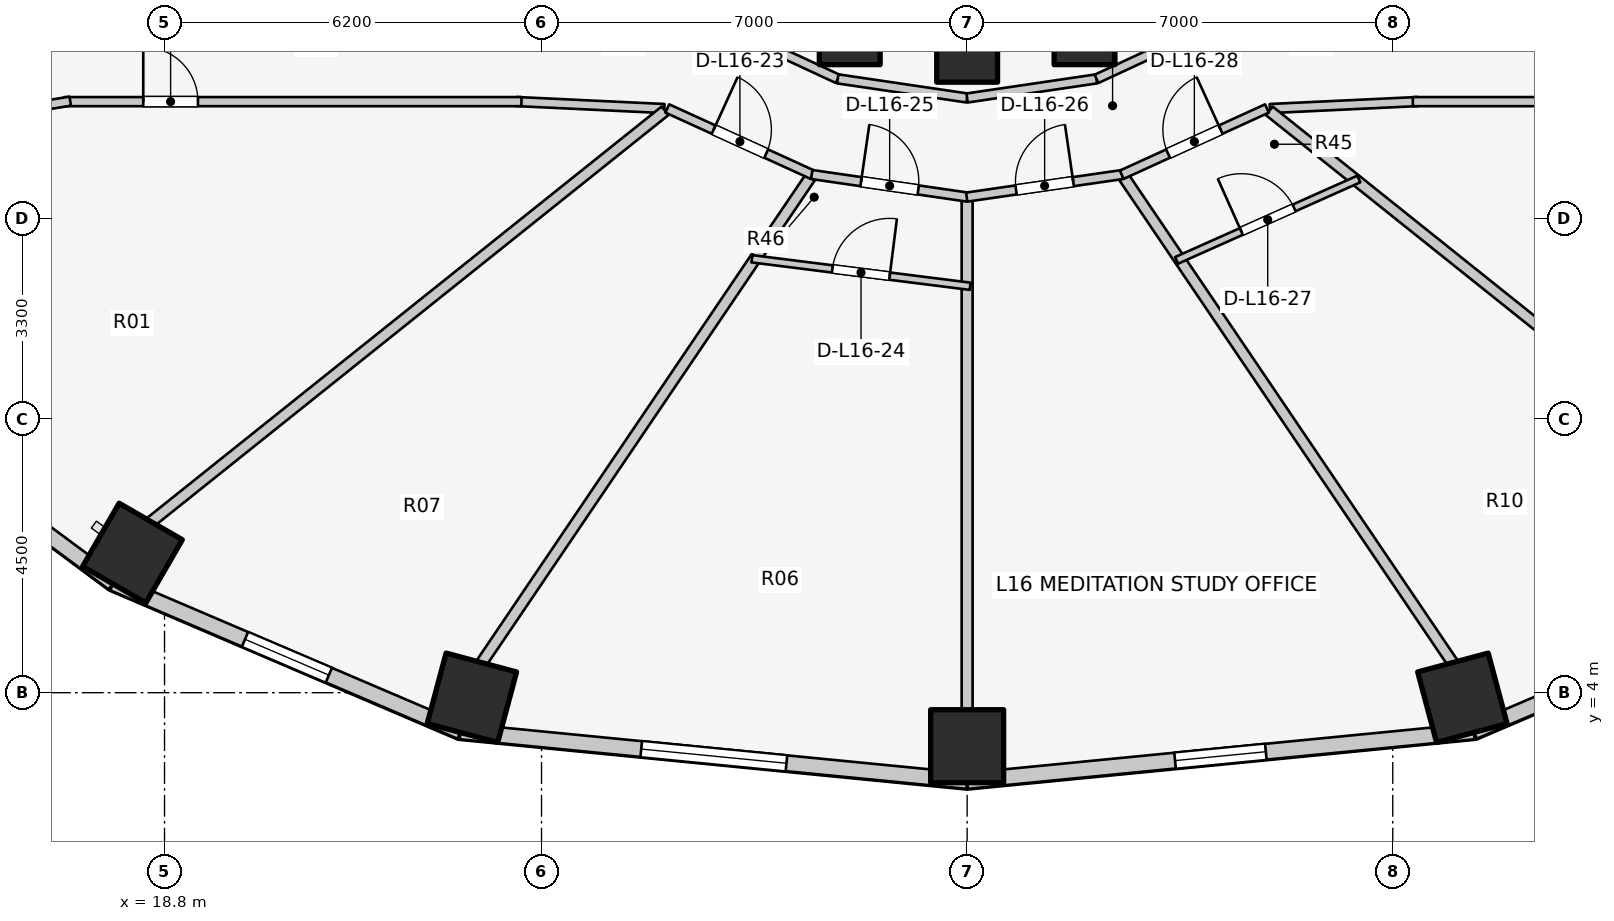
"""IFC4 building model, lengths in metres.
Left out: names, types, materials, properties, quantities, classifications, styles, units other than length and angle.
Written with IfcOpenShell. Run it as: python <this file> out.ifc"""

import sys

from ifc_helpers import new_model, si_unit, direction, frame, frame_2d, origin, origin_2d, place, context, subcontext, project, spatial, rectangle, extrude, element, fill, save


model = new_model("IFC4")
c1 = context("Model", 3, precision=1e-05, world=origin(), true_north=direction((0.0, 1.0)))
c2 = subcontext(c1, "Body", "Model", "MODEL_VIEW")
j1 = project(units=[si_unit("LENGTHUNIT", "METRE"), si_unit("PLANEANGLEUNIT", "RADIAN")], contexts=[c1])
p1 = place(None, origin())
s1 = spatial("IfcSite", under=j1, at=p1, CompositionType="ELEMENT")
p2 = place(p1, origin())
s2 = spatial("IfcBuilding", under=s1, at=p2, CompositionType="ELEMENT")
p3 = place(p2, frame((0.0, 0.0, 55.5)))
s3 = spatial("IfcBuildingStorey", under=s2, at=p3, CompositionType="ELEMENT", Elevation=55.5)
p4 = place(p3, frame((18.273, 6.296, 0.0), z_axis=(0.0, 0.0, 1.0), x_axis=(-0.5, -0.866025403784, 0.0)))
e1 = element("IfcColumn", 1, at=p4, inside=s3, PredefinedType="COLUMN", context=c2, shape_type="SweptSolid", body=[
    extrude(rectangle(XDim=1.2, YDim=1.2, at=origin_2d()), origin(), (0.0, 0.0, 1.0), 3.1),
])
p5 = place(p3, frame((30.069, 14.828, 0.0), z_axis=(0.0, 0.0, 1.0), x_axis=(1.0, 0.0, 0.0)))
e2 = element("IfcColumn", 2, at=p5, inside=s3, PredefinedType="COLUMN", context=c2, shape_type="SweptSolid", body=[
    extrude(rectangle(XDim=1.0, YDim=1.0, at=origin_2d()), origin(), (0.0, 0.0, 1.0), 3.1),
])
p6 = place(p3, frame((23.855, 3.916, 0.0), z_axis=(0.0, 0.0, 1.0), x_axis=(-0.258819045103, -0.965925826289, 0.0)))
e3 = element("IfcColumn", 3, at=p6, inside=s3, PredefinedType="COLUMN", context=c2, shape_type="SweptSolid", body=[
    extrude(rectangle(XDim=1.2, YDim=1.2, at=origin_2d()), origin(), (0.0, 0.0, 1.0), 3.1),
])
p7 = place(p3, frame((32.0, 14.54, 0.0), z_axis=(0.0, 0.0, 1.0), x_axis=(1.0, 0.0, 0.0)))
e4 = element("IfcColumn", 4, at=p7, inside=s3, PredefinedType="COLUMN", context=c2, shape_type="SweptSolid", body=[
    extrude(rectangle(XDim=1.0, YDim=1.0, at=origin_2d()), origin(), (0.0, 0.0, 1.0), 3.1),
])
p8 = place(p3, frame((32.0, 3.12, 0.0), z_axis=(0.0, 0.0, 1.0), x_axis=(0.0, -1.0, 0.0)))
e5 = element("IfcColumn", 5, at=p8, inside=s3, PredefinedType="COLUMN", context=c2, shape_type="SweptSolid", body=[
    extrude(rectangle(XDim=1.2, YDim=1.2, at=origin_2d()), origin(), (0.0, 0.0, 1.0), 3.1),
])
p9 = place(p3, frame((33.931, 14.828, 0.0), z_axis=(0.0, 0.0, 1.0), x_axis=(1.0, 0.0, 0.0)))
e6 = element("IfcColumn", 6, at=p9, inside=s3, PredefinedType="COLUMN", context=c2, shape_type="SweptSolid", body=[
    extrude(rectangle(XDim=1.0, YDim=1.0, at=origin_2d()), origin(), (0.0, 0.0, 1.0), 3.1),
])
p10 = place(p3, frame((40.145, 3.916, 0.0), z_axis=(0.0, 0.0, 1.0), x_axis=(0.258819045103, -0.965925826289, 0.0)))
e7 = element("IfcColumn", 7, at=p10, inside=s3, PredefinedType="COLUMN", context=c2, shape_type="SweptSolid", body=[
    extrude(rectangle(XDim=1.2, YDim=1.2, at=origin_2d()), origin(), (0.0, 0.0, 1.0), 3.1),
])
p11 = place(p3, frame((13.595, 9.035, 0.0), z_axis=(0.0, 0.0, 1.0), x_axis=(0.803477531792, -0.595335078679, 0.0)))
e8 = element("IfcWall", 8, at=p11, inside=s3, PredefinedType="STANDARD", context=c2, shape_type="SweptSolid", body=[
    extrude(rectangle(XDim=5.43, YDim=0.26, at=frame_2d((2.715, 0.0))), origin(), (0.0, 0.0, 1.0), 2.85),
])
p12 = place(p3, frame((17.958, 5.803, 0.0), z_axis=(0.0, 0.0, 1.0), x_axis=(0.919612132394, -0.39282760335, 0.0)))
e9 = element("IfcWall", 9, at=p12, inside=s3, PredefinedType="STANDARD", context=c2, shape_type="SweptSolid", body=[
    extrude(rectangle(XDim=6.209, YDim=0.26, at=frame_2d((3.105, 0.0))), origin(), (0.0, 0.0, 1.0), 2.85),
])
p13 = place(p12, frame((2.355, 0.0, 0.75)))
e10 = element("IfcOpeningElement", 10, at=p13, cuts=e9, PredefinedType="OPENING", context=c2, shape_type="SweptSolid", body=[
    extrude(rectangle(XDim=1.5, YDim=1.6, at=frame_2d((0.75, 0.8))), frame((0.0, 0.14, 0.0), z_axis=(0.0, -1.0, 0.0), x_axis=(1.0, 0.0, 0.0)), (0.0, 0.0, 1.0), 0.28),
])
p14 = place(p3, frame((23.668, 3.364, 0.0), z_axis=(0.0, 0.0, 1.0), x_axis=(0.995247718352, -0.097375454379, 0.0)))
e11 = element("IfcWall", 11, at=p14, inside=s3, PredefinedType="STANDARD", context=c2, shape_type="SweptSolid", body=[
    extrude(rectangle(XDim=8.372, YDim=0.26, at=frame_2d((4.186, 0.0))), origin(), (0.0, 0.0, 1.0), 2.85),
])
p15 = place(p14, frame((2.986, 0.0, 0.75)))
e12 = element("IfcOpeningElement", 12, at=p15, cuts=e11, PredefinedType="OPENING", context=c2, shape_type="SweptSolid", body=[
    extrude(rectangle(XDim=2.4, YDim=1.7, at=frame_2d((1.2, 0.85))), frame((0.0, 0.14, 0.0), z_axis=(0.0, -1.0, 0.0), x_axis=(1.0, 0.0, 0.0)), (0.0, 0.0, 1.0), 0.28),
])
p16 = place(p3, frame((32.0, 2.549, 0.0), z_axis=(0.0, 0.0, 1.0), x_axis=(0.995247718352, 0.097375454379, 0.0)))
e13 = element("IfcWall", 13, at=p16, inside=s3, PredefinedType="STANDARD", context=c2, shape_type="SweptSolid", body=[
    extrude(rectangle(XDim=8.372, YDim=0.26, at=frame_2d((4.186, 0.0))), origin(), (0.0, 0.0, 1.0), 2.85),
])
p17 = place(p16, frame((3.436, 0.0, 0.75)))
e14 = element("IfcOpeningElement", 14, at=p17, cuts=e13, PredefinedType="OPENING", context=c2, shape_type="SweptSolid", body=[
    extrude(rectangle(XDim=1.5, YDim=1.6, at=frame_2d((0.75, 0.8))), frame((0.0, 0.14, 0.0), z_axis=(0.0, -1.0, 0.0), x_axis=(1.0, 0.0, 0.0)), (0.0, 0.0, 1.0), 0.28),
])
p18 = place(p3, frame((40.332, 3.364, 0.0), z_axis=(0.0, 0.0, 1.0), x_axis=(0.919612132394, 0.39282760335, 0.0)))
e15 = element("IfcWall", 15, at=p18, inside=s3, PredefinedType="STANDARD", context=c2, shape_type="SweptSolid", body=[
    extrude(rectangle(XDim=6.209, YDim=0.26, at=frame_2d((3.105, 0.0))), origin(), (0.0, 0.0, 1.0), 2.85),
])
p19 = place(p18, frame((2.355, 0.0, 0.75)))
e16 = element("IfcOpeningElement", 16, at=p19, cuts=e15, PredefinedType="OPENING", context=c2, shape_type="SweptSolid", body=[
    extrude(rectangle(XDim=1.5, YDim=1.6, at=frame_2d((0.75, 0.8))), frame((0.0, 0.14, 0.0), z_axis=(0.0, -1.0, 0.0), x_axis=(1.0, 0.0, 0.0)), (0.0, 0.0, 1.0), 0.28),
])
p20 = place(p3, frame((27.89, 15.015, 0.0), z_axis=(0.0, 0.0, 1.0), x_axis=(0.906943449489, -0.421252393975, 0.0)))
e17 = element("IfcWall", 17, at=p20, inside=s3, PredefinedType="PARTITIONING", context=c2, shape_type="SweptSolid", body=[
    extrude(rectangle(XDim=2.186, YDim=0.15, at=frame_2d((1.093, 0.0))), origin(), (0.0, 0.0, 1.0), 2.237),
])
for number, where, z_axis, x_axis in (
    (18, (29.873, 14.094, 0.0), (0.0, 0.0, 1.0), (0.989, -0.146, 0.0)),
    (19, (32.0, 13.78, 0.0), (0.0, 0.0, 1.0), (0.989, 0.146, 0.0)),
):
    element("IfcWall", number, at=place(p3, frame(where, z_axis=z_axis, x_axis=x_axis)), inside=s3, PredefinedType="PARTITIONING", context=c2, shape_type="SweptSolid", body=[
        extrude(rectangle(XDim=2.151, YDim=0.15, at=frame_2d((1.075, 0.0))), origin(), (0.0, 0.0, 1.0), 2.237),
    ])
p21 = place(p3, frame((34.127, 14.094, 0.0), z_axis=(0.0, 0.0, 1.0), x_axis=(0.906943449489, 0.421252393975, 0.0)))
e20 = element("IfcWall", 20, at=p21, inside=s3, PredefinedType="PARTITIONING", context=c2, shape_type="SweptSolid", body=[
    extrude(rectangle(XDim=2.186, YDim=0.15, at=frame_2d((1.093, 0.0))), origin(), (0.0, 0.0, 1.0), 2.237),
])
p22 = place(p3, frame((27.02, 13.606, 0.0), z_axis=(0.0, 0.0, 1.0), x_axis=(-0.998877427952, 0.047369651964, 0.0)))
e21 = element("IfcWall", 21, at=p22, inside=s3, PredefinedType="PARTITIONING", context=c2, shape_type="SweptSolid", body=[
    extrude(rectangle(XDim=2.433, YDim=0.15, at=frame_2d((1.216, 0.0))), origin(), (0.0, 0.0, 1.0), 2.237),
])
p23 = place(p3, frame((17.15, 13.72, 0.0), z_axis=(0.0, 0.0, 1.0), x_axis=(1.0, 0.0, 0.0)))
e22 = element("IfcWall", 22, at=p23, inside=s3, PredefinedType="PARTITIONING", context=c2, shape_type="SweptSolid", body=[
    extrude(rectangle(XDim=7.52, YDim=0.15, at=frame_2d((3.76, 0.0))), origin(), (0.0, 0.0, 1.0), 2.237),
])
p24 = place(p23, frame((1.3, 0.0, 0.0)))
e23 = element("IfcOpeningElement", 23, at=p24, cuts=e22, PredefinedType="OPENING", context=c2, shape_type="SweptSolid", body=[
    extrude(rectangle(XDim=0.9, YDim=2.1, at=frame_2d((0.45, 1.05))), frame((0.0, 0.085, 0.0), z_axis=(0.0, -1.0, 0.0), x_axis=(1.0, 0.0, 0.0)), (0.0, 0.0, 1.0), 0.17),
])
p25 = place(p3, frame((17.249, 13.728, 0.0), z_axis=(0.0, 0.0, 1.0), x_axis=(-0.98693078372, -0.161144742846, 0.0)))
e24 = element("IfcWall", 24, at=p25, inside=s3, PredefinedType="PARTITIONING", context=c2, shape_type="SweptSolid", body=[
    extrude(rectangle(XDim=7.557, YDim=0.15, at=frame_2d((3.779, 0.0))), origin(), (0.0, 0.0, 1.0), 2.069),
])
p26 = place(p3, frame((36.98, 13.606, 0.0), z_axis=(0.0, 0.0, 1.0), x_axis=(0.998877427952, 0.047369651964, 0.0)))
e25 = element("IfcWall", 25, at=p26, inside=s3, PredefinedType="PARTITIONING", context=c2, shape_type="SweptSolid", body=[
    extrude(rectangle(XDim=2.433, YDim=0.15, at=frame_2d((1.216, 0.0))), origin(), (0.0, 0.0, 1.0), 2.237),
])
p27 = place(p3, frame((39.33, 13.72, 0.0), z_axis=(0.0, 0.0, 1.0), x_axis=(1.0, 0.0, 0.0)))
e26 = element("IfcWall", 26, at=p27, inside=s3, PredefinedType="PARTITIONING", context=c2, shape_type="SweptSolid", body=[
    extrude(rectangle(XDim=7.52, YDim=0.15, at=frame_2d((3.76, 0.0))), origin(), (0.0, 0.0, 1.0), 2.237),
])
p28 = place(p27, frame((5.22, 0.0, 0.0)))
e27 = element("IfcOpeningElement", 27, at=p28, cuts=e26, PredefinedType="OPENING", context=c2, shape_type="SweptSolid", body=[
    extrude(rectangle(XDim=0.9, YDim=2.1, at=frame_2d((0.45, 1.05))), frame((0.0, 0.085, 0.0), z_axis=(0.0, -1.0, 0.0), x_axis=(1.0, 0.0, 0.0)), (0.0, 0.0, 1.0), 0.17),
])
p29 = place(p3, frame((27.032, 13.569, 0.0), z_axis=(0.0, 0.0, 1.0), x_axis=(-0.781055486744, -0.624461629428, 0.0)))
e28 = element("IfcWall", 28, at=p29, inside=s3, PredefinedType="PARTITIONING", context=c2, shape_type="SweptSolid", body=[
    extrude(rectangle(XDim=10.843, YDim=0.18, at=frame_2d((5.422, 0.0))), origin(), (0.0, 0.0, 1.0), 2.237),
])
p30 = place(p3, frame((29.42, 12.474, 0.0), z_axis=(0.0, 0.0, 1.0), x_axis=(-0.560641882674, -0.828058379217, 0.0)))
e29 = element("IfcWall", 29, at=p30, inside=s3, PredefinedType="PARTITIONING", context=c2, shape_type="SweptSolid", body=[
    extrude(rectangle(XDim=9.658, YDim=0.18, at=frame_2d((4.829, 0.0))), origin(), (0.0, 0.0, 1.0), 2.237),
])
p31 = place(p3, frame((32.0, 12.095, 0.0), z_axis=(0.0, 0.0, 1.0), x_axis=(0.0, -1.0, 0.0)))
e30 = element("IfcWall", 30, at=p31, inside=s3, PredefinedType="PARTITIONING", context=c2, shape_type="SweptSolid", body=[
    extrude(rectangle(XDim=8.395, YDim=0.18, at=frame_2d((4.198, 0.0))), origin(), (0.0, 0.0, 1.0), 2.237),
])
p32 = place(p3, frame((34.58, 12.474, 0.0), z_axis=(0.0, 0.0, 1.0), x_axis=(0.560641882674, -0.828058379217, 0.0)))
e31 = element("IfcWall", 31, at=p32, inside=s3, PredefinedType="PARTITIONING", context=c2, shape_type="SweptSolid", body=[
    extrude(rectangle(XDim=9.658, YDim=0.18, at=frame_2d((4.829, 0.0))), origin(), (0.0, 0.0, 1.0), 2.237),
])
p33 = place(p3, frame((36.968, 13.569, 0.0), z_axis=(0.0, 0.0, 1.0), x_axis=(0.781055486744, -0.624461629428, 0.0)))
e32 = element("IfcWall", 32, at=p33, inside=s3, PredefinedType="PARTITIONING", context=c2, shape_type="SweptSolid", body=[
    extrude(rectangle(XDim=10.843, YDim=0.18, at=frame_2d((5.422, 0.0))), origin(), (0.0, 0.0, 1.0), 2.237),
])
p34 = place(p3, frame((27.069, 13.607, 0.0), z_axis=(0.0, 0.0, 1.0), x_axis=(0.909747571199, -0.415161843982, 0.0)))
e33 = element("IfcWall", 33, at=p34, inside=s3, PredefinedType="PARTITIONING", context=c2, shape_type="SweptSolid", body=[
    extrude(rectangle(XDim=2.625, YDim=0.15, at=frame_2d((1.312, 0.0))), origin(), (0.0, 0.0, 1.0), 2.237),
])
p35 = place(p34, frame((0.838, 0.0, 0.0)))
e34 = element("IfcOpeningElement", 34, at=p35, cuts=e33, PredefinedType="OPENING", context=c2, shape_type="SweptSolid", body=[
    extrude(rectangle(XDim=0.95, YDim=2.1, at=frame_2d((0.475, 1.05))), frame((0.0, 0.085, 0.0), z_axis=(0.0, -1.0, 0.0), x_axis=(1.0, 0.0, 0.0)), (0.0, 0.0, 1.0), 0.17),
])
p36 = place(p3, frame((28.46, 11.136, 0.0), z_axis=(0.0, 0.0, 1.0), x_axis=(0.99214337853, -0.125106020798, 0.0)))
e35 = element("IfcWall", 35, at=p36, inside=s3, PredefinedType="MOVABLE", context=c2, shape_type="SweptSolid", body=[
    extrude(rectangle(XDim=3.618, YDim=0.12, at=frame_2d((1.809, 0.0))), origin(), (0.0, 0.0, 1.0), 2.237),
])
p37 = place(p36, frame((1.334, 0.0, 0.0)))
e36 = element("IfcOpeningElement", 36, at=p37, cuts=e35, PredefinedType="OPENING", context=c2, shape_type="SweptSolid", body=[
    extrude(rectangle(XDim=0.95, YDim=2.1, at=frame_2d((0.475, 1.05))), frame((0.0, 0.07, 0.0), z_axis=(0.0, -1.0, 0.0), x_axis=(1.0, 0.0, 0.0)), (0.0, 0.0, 1.0), 0.14),
])
p38 = place(p3, frame((29.444, 12.522, 0.0), z_axis=(0.0, 0.0, 1.0), x_axis=(0.989637894688, -0.143585644814, 0.0)))
e37 = element("IfcWall", 37, at=p38, inside=s3, PredefinedType="PARTITIONING", context=c2, shape_type="SweptSolid", body=[
    extrude(rectangle(XDim=2.59, YDim=0.15, at=frame_2d((1.295, 0.0))), origin(), (0.0, 0.0, 1.0), 2.237),
])
p39 = place(p38, frame((0.82, 0.0, 0.0)))
e38 = element("IfcOpeningElement", 38, at=p39, cuts=e37, PredefinedType="OPENING", context=c2, shape_type="SweptSolid", body=[
    extrude(rectangle(XDim=0.95, YDim=2.1, at=frame_2d((0.475, 1.05))), frame((0.0, 0.085, 0.0), z_axis=(0.0, -1.0, 0.0), x_axis=(1.0, 0.0, 0.0)), (0.0, 0.0, 1.0), 0.17),
])
p40 = place(p3, frame((31.993, 12.15, 0.0), z_axis=(0.0, 0.0, 1.0), x_axis=(0.989637894688, 0.143585644814, 0.0)))
e39 = element("IfcWall", 39, at=p40, inside=s3, PredefinedType="PARTITIONING", context=c2, shape_type="SweptSolid", body=[
    extrude(rectangle(XDim=2.59, YDim=0.15, at=frame_2d((1.295, 0.0))), origin(), (0.0, 0.0, 1.0), 2.237),
])
p41 = place(p40, frame((0.82, 0.0, 0.0)))
e40 = element("IfcOpeningElement", 40, at=p41, cuts=e39, PredefinedType="OPENING", context=c2, shape_type="SweptSolid", body=[
    extrude(rectangle(XDim=0.95, YDim=2.1, at=frame_2d((0.475, 1.05))), frame((0.0, 0.085, 0.0), z_axis=(0.0, -1.0, 0.0), x_axis=(1.0, 0.0, 0.0)), (0.0, 0.0, 1.0), 0.17),
])
p42 = place(p3, frame((35.445, 11.109, 0.0), z_axis=(0.0, 0.0, 1.0), x_axis=(0.913036999281, 0.407876743569, 0.0)))
e41 = element("IfcWall", 41, at=p42, inside=s3, PredefinedType="MOVABLE", context=c2, shape_type="SweptSolid", body=[
    extrude(rectangle(XDim=3.282, YDim=0.12, at=frame_2d((1.641, 0.0))), origin(), (0.0, 0.0, 1.0), 2.237),
])
p43 = place(p42, frame((1.166, 0.0, 0.0)))
e42 = element("IfcOpeningElement", 42, at=p43, cuts=e41, PredefinedType="OPENING", context=c2, shape_type="SweptSolid", body=[
    extrude(rectangle(XDim=0.95, YDim=2.1, at=frame_2d((0.475, 1.05))), frame((0.0, 0.07, 0.0), z_axis=(0.0, -1.0, 0.0), x_axis=(1.0, 0.0, 0.0)), (0.0, 0.0, 1.0), 0.14),
])
p44 = place(p3, frame((34.543, 12.518, 0.0), z_axis=(0.0, 0.0, 1.0), x_axis=(0.909747571199, 0.415161843982, 0.0)))
e43 = element("IfcWall", 43, at=p44, inside=s3, PredefinedType="PARTITIONING", context=c2, shape_type="SweptSolid", body=[
    extrude(rectangle(XDim=2.625, YDim=0.15, at=frame_2d((1.312, 0.0))), origin(), (0.0, 0.0, 1.0), 2.237),
])
p45 = place(p44, frame((0.838, 0.0, 0.0)))
e44 = element("IfcOpeningElement", 44, at=p45, cuts=e43, PredefinedType="OPENING", context=c2, shape_type="SweptSolid", body=[
    extrude(rectangle(XDim=0.95, YDim=2.1, at=frame_2d((0.475, 1.05))), frame((0.0, 0.085, 0.0), z_axis=(0.0, -1.0, 0.0), x_axis=(1.0, 0.0, 0.0)), (0.0, 0.0, 1.0), 0.17),
])
p46 = place(p13, origin())
e45 = element("IfcWindow", 45, at=p46, inside=s3, PartitioningType="SINGLE_PANEL", PredefinedType="WINDOW", context=c2, shape_type="SweptSolid", body=[
    extrude(rectangle(XDim=1.5, YDim=1.6, at=frame_2d((0.75, 0.8))), frame((0.0, 0.03, 0.0), z_axis=(0.0, -1.0, 0.0), x_axis=(1.0, 0.0, 0.0)), (0.0, 0.0, 1.0), 0.06),
])
fill(e10, e45)
p47 = place(p15, origin())
e46 = element("IfcWindow", 46, at=p47, inside=s3, PartitioningType="SINGLE_PANEL", PredefinedType="WINDOW", context=c2, shape_type="SweptSolid", body=[
    extrude(rectangle(XDim=2.4, YDim=1.7, at=frame_2d((1.2, 0.85))), frame((0.0, 0.03, 0.0), z_axis=(0.0, -1.0, 0.0), x_axis=(1.0, 0.0, 0.0)), (0.0, 0.0, 1.0), 0.06),
])
fill(e12, e46)
p48 = place(p17, origin())
e47 = element("IfcWindow", 47, at=p48, inside=s3, PartitioningType="SINGLE_PANEL", PredefinedType="WINDOW", context=c2, shape_type="SweptSolid", body=[
    extrude(rectangle(XDim=1.5, YDim=1.6, at=frame_2d((0.75, 0.8))), frame((0.0, 0.03, 0.0), z_axis=(0.0, -1.0, 0.0), x_axis=(1.0, 0.0, 0.0)), (0.0, 0.0, 1.0), 0.06),
])
fill(e14, e47)
p49 = place(p24, origin())
e48 = element("IfcDoor", 48, at=p49, inside=s3, OperationType="SINGLE_SWING_LEFT", PredefinedType="DOOR", context=c2, shape_type="SweptSolid", body=[
    extrude(rectangle(XDim=0.9, YDim=2.1, at=frame_2d((0.45, 1.05))), frame((0.0, 0.025, 0.0), z_axis=(0.0, -1.0, 0.0), x_axis=(1.0, 0.0, 0.0)), (0.0, 0.0, 1.0), 0.05),
])
fill(e23, e48)
p50 = place(p35, origin())
e49 = element("IfcDoor", 49, at=p50, inside=s3, OperationType="SINGLE_SWING_LEFT", PredefinedType="DOOR", context=c2, shape_type="SweptSolid", body=[
    extrude(rectangle(XDim=0.95, YDim=2.1, at=frame_2d((0.475, 1.05))), frame((0.0, 0.025, 0.0), z_axis=(0.0, -1.0, 0.0), x_axis=(1.0, 0.0, 0.0)), (0.0, 0.0, 1.0), 0.05),
])
fill(e34, e49)
p51 = place(p37, origin())
e50 = element("IfcDoor", 50, at=p51, inside=s3, OperationType="SINGLE_SWING_RIGHT", PredefinedType="DOOR", context=c2, shape_type="SweptSolid", body=[
    extrude(rectangle(XDim=0.95, YDim=2.1, at=frame_2d((0.475, 1.05))), frame((0.0, 0.025, 0.0), z_axis=(0.0, -1.0, 0.0), x_axis=(1.0, 0.0, 0.0)), (0.0, 0.0, 1.0), 0.05),
])
fill(e36, e50)
p52 = place(p39, origin())
e51 = element("IfcDoor", 51, at=p52, inside=s3, OperationType="SINGLE_SWING_LEFT", PredefinedType="DOOR", context=c2, shape_type="SweptSolid", body=[
    extrude(rectangle(XDim=0.95, YDim=2.1, at=frame_2d((0.475, 1.05))), frame((0.0, 0.025, 0.0), z_axis=(0.0, -1.0, 0.0), x_axis=(1.0, 0.0, 0.0)), (0.0, 0.0, 1.0), 0.05),
])
fill(e38, e51)
p53 = place(p41, origin())
e52 = element("IfcDoor", 52, at=p53, inside=s3, OperationType="SINGLE_SWING_RIGHT", PredefinedType="DOOR", context=c2, shape_type="SweptSolid", body=[
    extrude(rectangle(XDim=0.95, YDim=2.1, at=frame_2d((0.475, 1.05))), frame((0.0, 0.025, 0.0), z_axis=(0.0, -1.0, 0.0), x_axis=(1.0, 0.0, 0.0)), (0.0, 0.0, 1.0), 0.05),
])
fill(e40, e52)
p54 = place(p43, origin())
e53 = element("IfcDoor", 53, at=p54, inside=s3, OperationType="SINGLE_SWING_LEFT", PredefinedType="DOOR", context=c2, shape_type="SweptSolid", body=[
    extrude(rectangle(XDim=0.95, YDim=2.1, at=frame_2d((0.475, 1.05))), frame((0.0, 0.025, 0.0), z_axis=(0.0, -1.0, 0.0), x_axis=(1.0, 0.0, 0.0)), (0.0, 0.0, 1.0), 0.05),
])
fill(e42, e53)
p55 = place(p45, origin())
e54 = element("IfcDoor", 54, at=p55, inside=s3, OperationType="SINGLE_SWING_RIGHT", PredefinedType="DOOR", context=c2, shape_type="SweptSolid", body=[
    extrude(rectangle(XDim=0.95, YDim=2.1, at=frame_2d((0.475, 1.05))), frame((0.0, 0.025, 0.0), z_axis=(0.0, -1.0, 0.0), x_axis=(1.0, 0.0, 0.0)), (0.0, 0.0, 1.0), 0.05),
])
fill(e44, e54)
save(model, sys.argv[1])
